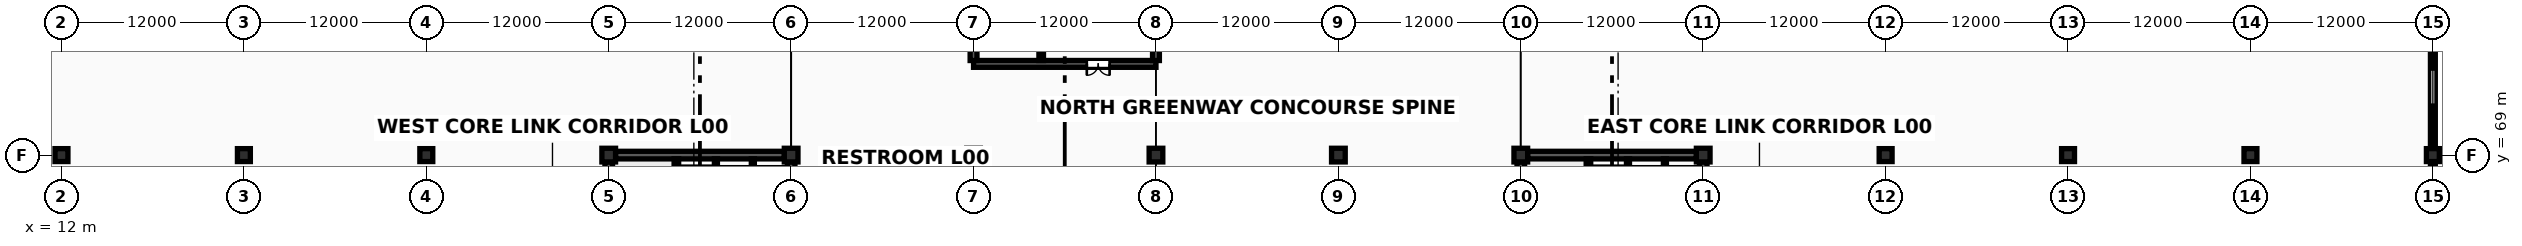
"""IFC4 building model, lengths in metres.
Left out: names, types, materials, properties, quantities, classifications, styles, units other than length and angle.
Written with IfcOpenShell. Run it as: python <this file> out.ifc"""

import sys

from ifc_helpers import new_model, si_unit, direction, frame, frame_2d, origin, origin_2d, place, context, subcontext, project, spatial, rectangle, extrude, element, fill, save


model = new_model("IFC4")
c1 = context("Model", 3, precision=1e-05, world=origin(), true_north=direction((0.0, 1.0)))
c2 = subcontext(c1, "Body", "Model", "MODEL_VIEW")
j1 = project(units=[si_unit("LENGTHUNIT", "METRE"), si_unit("PLANEANGLEUNIT", "RADIAN")], contexts=[c1])
p1 = place(None, origin())
s1 = spatial("IfcSite", under=j1, at=p1, CompositionType="ELEMENT")
p2 = place(p1, origin())
s2 = spatial("IfcBuilding", under=s1, at=p2, CompositionType="ELEMENT")
p3 = place(p2, origin())
s3 = spatial("IfcBuildingStorey", under=s2, at=p3, CompositionType="ELEMENT", Elevation=0.0)
for number, where, z_axis, x_axis in (
    (1, (12.0, 69.0, 0.0), (0.0, 0.0, 1.0), (1.0, 0.0, 0.0)),
    (2, (24.0, 69.0, 0.0), (0.0, 0.0, 1.0), (1.0, 0.0, 0.0)),
    (3, (36.0, 69.0, 0.0), (0.0, 0.0, 1.0), (1.0, 0.0, 0.0)),
):
    element("IfcColumn", number, at=place(p3, frame(where, z_axis=z_axis, x_axis=x_axis)), inside=s3, PredefinedType="COLUMN", context=c2, shape_type="SweptSolid", body=[
        extrude(rectangle(XDim=0.85, YDim=0.85, at=origin_2d()), origin(), (0.0, 0.0, 1.0), 5.4),
    ])
for number, where, z_axis, x_axis in (
    (4, (48.0, 69.0, 0.0), (0.0, 0.0, 1.0), (1.0, 0.0, 0.0)),
    (5, (60.0, 69.0, 0.0), (0.0, 0.0, 1.0), (1.0, 0.0, 0.0)),
    (6, (72.0, 69.0, 0.0), (0.0, 0.0, 1.0), (1.0, 0.0, 0.0)),
    (7, (84.0, 69.0, 0.0), (0.0, 0.0, 1.0), (1.0, 0.0, 0.0)),
    (8, (96.0, 69.0, 0.0), (0.0, 0.0, 1.0), (1.0, 0.0, 0.0)),
    (9, (108.0, 69.0, 0.0), (0.0, 0.0, 1.0), (1.0, 0.0, 0.0)),
    (10, (120.0, 69.0, 0.0), (0.0, 0.0, 1.0), (1.0, 0.0, 0.0)),
):
    element("IfcColumn", number, at=place(p3, frame(where, z_axis=z_axis, x_axis=x_axis)), inside=s3, PredefinedType="COLUMN", context=c2, shape_type="SweptSolid", body=[
        extrude(rectangle(XDim=0.9, YDim=0.9, at=origin_2d()), origin(), (0.0, 0.0, 1.0), 5.4),
    ])
for number, where, z_axis, x_axis in (
    (11, (132.0, 69.0, 0.0), (0.0, 0.0, 1.0), (1.0, 0.0, 0.0)),
    (12, (144.0, 69.0, 0.0), (0.0, 0.0, 1.0), (1.0, 0.0, 0.0)),
    (13, (156.0, 69.0, 0.0), (0.0, 0.0, 1.0), (1.0, 0.0, 0.0)),
    (14, (168.0, 69.0, 0.0), (0.0, 0.0, 1.0), (1.0, 0.0, 0.0)),
):
    element("IfcColumn", number, at=place(p3, frame(where, z_axis=z_axis, x_axis=x_axis)), inside=s3, PredefinedType="COLUMN", context=c2, shape_type="SweptSolid", body=[
        extrude(rectangle(XDim=0.85, YDim=0.85, at=origin_2d()), origin(), (0.0, 0.0, 1.0), 5.4),
    ])
p4 = place(p3, frame((48.447, 69.0, 0.0), z_axis=(0.0, 0.0, 1.0), x_axis=(1.0, 0.0, 0.0)))
e15 = element("IfcWall", 15, at=p4, inside=s3, PredefinedType="SHEAR", context=c2, shape_type="SweptSolid", body=[
    extrude(rectangle(XDim=11.106, YDim=0.5, at=frame_2d((5.553, 0.0))), origin(), (0.0, 0.0, 1.0), 5.203),
])
p5 = place(p3, frame((48.0, 57.447, 0.0), z_axis=(0.0, 0.0, 1.0), x_axis=(0.0, 1.0, 0.0)))
e16 = element("IfcWall", 16, at=p5, inside=s3, PredefinedType="SHEAR", context=c2, shape_type="SweptSolid", body=[
    extrude(rectangle(XDim=11.106, YDim=0.5, at=frame_2d((5.553, 0.0))), origin(), (0.0, 0.0, 1.0), 5.203),
])
p6 = place(p5, frame((4.953, 0.0, 0.0)))
e17 = element("IfcOpeningElement", 17, at=p6, cuts=e16, PredefinedType="OPENING", context=c2, shape_type="SweptSolid", body=[
    extrude(rectangle(XDim=1.2, YDim=2.2, at=frame_2d((0.6, 1.1))), frame((0.0, 0.265, 0.0), z_axis=(0.0, -1.0, 0.0), x_axis=(1.0, 0.0, 0.0)), (0.0, 0.0, 1.0), 0.53),
])
p7 = place(p3, frame((60.0, 57.447, 0.0), z_axis=(0.0, 0.0, 1.0), x_axis=(0.0, 1.0, 0.0)))
e18 = element("IfcWall", 18, at=p7, inside=s3, PredefinedType="SHEAR", context=c2, shape_type="SweptSolid", body=[
    extrude(rectangle(XDim=11.106, YDim=0.5, at=frame_2d((5.553, 0.0))), origin(), (0.0, 0.0, 1.0), 5.203),
])
p8 = place(p3, frame((52.45, 57.247, 0.0), z_axis=(0.0, 0.0, 1.0), x_axis=(0.0, 1.0, 0.0)))
e19 = element("IfcWall", 19, at=p8, inside=s3, PredefinedType="SHEAR", context=c2, shape_type="SweptSolid", body=[
    extrude(rectangle(XDim=11.506, YDim=0.3, at=frame_2d((5.753, 0.0))), origin(), (0.0, 0.0, 1.0), 5.203),
])
p9 = place(p8, frame((0.9, 0.0, 0.0)))
e20 = element("IfcOpeningElement", 20, at=p9, cuts=e19, PredefinedType="OPENING", context=c2, shape_type="SweptSolid", body=[
    extrude(rectangle(XDim=1.1, YDim=2.2, at=frame_2d((0.55, 1.1))), frame((0.0, 0.165, 0.0), z_axis=(0.0, -1.0, 0.0), x_axis=(1.0, 0.0, 0.0)), (0.0, 0.0, 1.0), 0.33),
])
for number, where, z_axis, x_axis in (
    (21, (55.05, 65.92, 0.0), (0.0, 0.0, 1.0), (0.0, 1.0, 0.0)),
    (22, (57.48, 65.92, 0.0), (0.0, 0.0, 1.0), (0.0, 1.0, 0.0)),
):
    element("IfcWall", number, at=place(p3, frame(where, z_axis=z_axis, x_axis=x_axis)), inside=s3, PredefinedType="SOLIDWALL", context=c2, shape_type="SweptSolid", body=[
        extrude(rectangle(XDim=2.83, YDim=0.2, at=frame_2d((1.415, 0.0))), origin(), (0.0, 0.0, 1.0), 5.193),
    ])
for number, where, z_axis, x_axis in (
    (23, (108.447, 69.0, 0.0), (0.0, 0.0, 1.0), (1.0, 0.0, 0.0)),
    (24, (108.0, 57.447, 0.0), (0.0, 0.0, 1.0), (0.0, 1.0, 0.0)),
    (25, (120.0, 57.447, 0.0), (0.0, 0.0, 1.0), (0.0, 1.0, 0.0)),
):
    element("IfcWall", number, at=place(p3, frame(where, z_axis=z_axis, x_axis=x_axis)), inside=s3, PredefinedType="SHEAR", context=c2, shape_type="SweptSolid", body=[
        extrude(rectangle(XDim=11.106, YDim=0.5, at=frame_2d((5.553, 0.0))), origin(), (0.0, 0.0, 1.0), 5.203),
    ])
p10 = place(p3, frame((112.45, 57.247, 0.0), z_axis=(0.0, 0.0, 1.0), x_axis=(0.0, 1.0, 0.0)))
e26 = element("IfcWall", 26, at=p10, inside=s3, PredefinedType="SHEAR", context=c2, shape_type="SweptSolid", body=[
    extrude(rectangle(XDim=11.506, YDim=0.3, at=frame_2d((5.753, 0.0))), origin(), (0.0, 0.0, 1.0), 5.203),
])
p11 = place(p10, frame((0.9, 0.0, 0.0)))
e27 = element("IfcOpeningElement", 27, at=p11, cuts=e26, PredefinedType="OPENING", context=c2, shape_type="SweptSolid", body=[
    extrude(rectangle(XDim=1.1, YDim=2.2, at=frame_2d((0.55, 1.1))), frame((0.0, 0.165, 0.0), z_axis=(0.0, -1.0, 0.0), x_axis=(1.0, 0.0, 0.0)), (0.0, 0.0, 1.0), 0.33),
])
for number, where, z_axis, x_axis in (
    (28, (115.05, 65.92, 0.0), (0.0, 0.0, 1.0), (0.0, 1.0, 0.0)),
    (29, (117.48, 65.92, 0.0), (0.0, 0.0, 1.0), (0.0, 1.0, 0.0)),
):
    element("IfcWall", number, at=place(p3, frame(where, z_axis=z_axis, x_axis=x_axis)), inside=s3, PredefinedType="SOLIDWALL", context=c2, shape_type="SweptSolid", body=[
        extrude(rectangle(XDim=2.83, YDim=0.2, at=frame_2d((1.415, 0.0))), origin(), (0.0, 0.0, 1.0), 5.193),
    ])
p12 = place(p3, frame((72.0, 75.0, 0.0), z_axis=(0.0, 0.0, 1.0), x_axis=(1.0, 0.0, 0.0)))
e30 = element("IfcWall", 30, at=p12, inside=s3, PredefinedType="SHEAR", context=c2, shape_type="SweptSolid", body=[
    extrude(rectangle(XDim=12.0, YDim=0.45, at=frame_2d((6.0, 0.0))), origin(), (0.0, 0.0, 1.0), 5.203),
])
p13 = place(p12, frame((7.45, 0.0, 0.0)))
e31 = element("IfcOpeningElement", 31, at=p13, cuts=e30, PredefinedType="OPENING", context=c2, shape_type="SweptSolid", body=[
    extrude(rectangle(XDim=1.5, YDim=2.25, at=frame_2d((0.75, 1.125))), frame((0.0, 0.24, 0.0), z_axis=(0.0, -1.0, 0.0), x_axis=(1.0, 0.0, 0.0)), (0.0, 0.0, 1.0), 0.48),
])
for number, where, z_axis, x_axis in (
    (32, (72.0, 75.222, 0.0), (0.0, 0.0, 1.0), (0.0, 1.0, 0.0)),
    (33, (84.0, 75.222, 0.0), (0.0, 0.0, 1.0), (0.0, 1.0, 0.0)),
):
    element("IfcWall", number, at=place(p3, frame(where, z_axis=z_axis, x_axis=x_axis)), inside=s3, PredefinedType="SHEAR", context=c2, shape_type="SweptSolid", body=[
        extrude(rectangle(XDim=11.356, YDim=0.45, at=frame_2d((5.678, 0.0))), origin(), (0.0, 0.0, 1.0), 5.203),
    ])
p14 = place(p3, frame((76.45, 75.222, 0.0), z_axis=(0.0, 0.0, 1.0), x_axis=(0.0, 1.0, 0.0)))
e34 = element("IfcWall", 34, at=p14, inside=s3, PredefinedType="SHEAR", context=c2, shape_type="SweptSolid", body=[
    extrude(rectangle(XDim=11.556, YDim=0.3, at=frame_2d((5.778, 0.0))), origin(), (0.0, 0.0, 1.0), 5.203),
])
p15 = place(p14, frame((0.9, 0.0, 0.0)))
e35 = element("IfcOpeningElement", 35, at=p15, cuts=e34, PredefinedType="OPENING", context=c2, shape_type="SweptSolid", body=[
    extrude(rectangle(XDim=1.1, YDim=2.2, at=frame_2d((0.55, 1.1))), frame((0.0, 0.165, 0.0), z_axis=(0.0, -1.0, 0.0), x_axis=(1.0, 0.0, 0.0)), (0.0, 0.0, 1.0), 0.33),
])
p16 = place(p3, frame((168.0, 57.423, 0.0), z_axis=(0.0, 0.0, 1.0), x_axis=(0.0, 1.0, 0.0)))
e36 = element("IfcWall", 36, at=p16, inside=s3, PredefinedType="SOLIDWALL", context=c2, shape_type="SweptSolid", body=[
    extrude(rectangle(XDim=11.154, YDim=0.32, at=frame_2d((5.577, 0.0))), origin(), (0.0, 0.0, 1.0), 3.85),
])
p17 = place(p16, frame((4.537, 0.0, 0.0)))
e37 = element("IfcOpeningElement", 37, at=p17, cuts=e36, PredefinedType="OPENING", context=c2, shape_type="SweptSolid", body=[
    extrude(rectangle(XDim=2.08, YDim=2.44, at=frame_2d((1.04, 1.22))), frame((0.0, 0.175, 0.0), z_axis=(0.0, -1.0, 0.0), x_axis=(1.0, 0.0, 0.0)), (0.0, 0.0, 1.0), 0.35),
])
p18 = place(p3, frame((168.0, 69.423, 0.0), z_axis=(0.0, 0.0, 1.0), x_axis=(0.0, 1.0, 0.0)))
e38 = element("IfcWall", 38, at=p18, inside=s3, PredefinedType="SOLIDWALL", context=c2, shape_type="SweptSolid", body=[
    extrude(rectangle(XDim=8.104, YDim=0.32, at=frame_2d((4.052, 0.0))), origin(), (0.0, 0.0, 1.0), 3.85),
])
p19 = place(p18, frame((2.892, 0.0, 0.55)))
e39 = element("IfcOpeningElement", 39, at=p19, cuts=e38, PredefinedType="OPENING", context=c2, shape_type="SweptSolid", body=[
    extrude(rectangle(XDim=2.32, YDim=1.42, at=frame_2d((1.16, 0.71))), frame((0.0, 0.175, 0.0), z_axis=(0.0, -1.0, 0.0), x_axis=(1.0, 0.0, 0.0)), (0.0, 0.0, 1.0), 0.35),
])
p20 = place(p19, origin())
e40 = element("IfcWindow", 40, at=p20, inside=s3, PartitioningType="DOUBLE_PANEL_VERTICAL", PredefinedType="WINDOW", context=c2, shape_type="SweptSolid", body=[
    extrude(rectangle(XDim=2.32, YDim=1.42, at=frame_2d((1.16, 0.71))), frame((0.0, 0.03, 0.0), z_axis=(0.0, -1.0, 0.0), x_axis=(1.0, 0.0, 0.0)), (0.0, 0.0, 1.0), 0.06),
])
fill(e39, e40)
p21 = place(p13, origin())
e41 = element("IfcDoor", 41, at=p21, inside=s3, OperationType="DOUBLE_DOOR_SINGLE_SWING", PredefinedType="DOOR", context=c2, shape_type="SweptSolid", body=[
    extrude(rectangle(XDim=1.5, YDim=2.25, at=frame_2d((0.75, 1.125))), frame((0.0, 0.025, 0.0), z_axis=(0.0, -1.0, 0.0), x_axis=(1.0, 0.0, 0.0)), (0.0, 0.0, 1.0), 0.05),
])
fill(e31, e41)
save(model, sys.argv[1])
